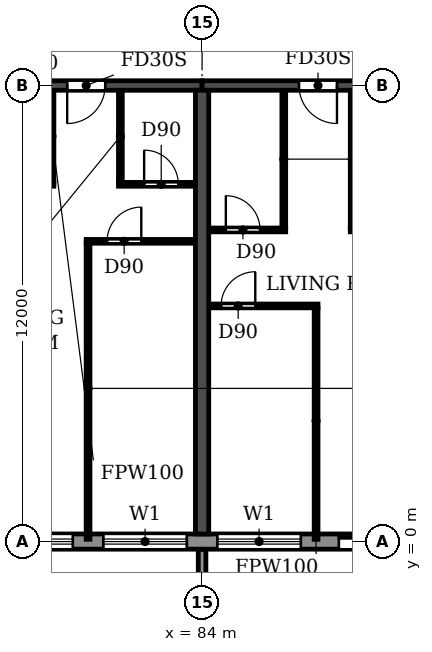
"""IFC4 building model, lengths in metres.
Left out: names, types, materials, properties, quantities, classifications, styles, units other than length and angle.
Written with IfcOpenShell. Run it as: python <this file> out.ifc"""

import sys

from ifc_helpers import new_model, si_unit, direction, frame, frame_2d, origin, place, context, subcontext, project, spatial, polyline, rectangle, outline, extrude, source, transform, mapped, element, fill, save


model = new_model("IFC4")
c1 = context("Model", 3, precision=1e-05, world=origin(), true_north=direction((0.0, 1.0)))
c2 = subcontext(c1, "Body", "Model", "MODEL_VIEW")
j1 = project(units=[si_unit("LENGTHUNIT", "METRE"), si_unit("PLANEANGLEUNIT", "RADIAN")], contexts=[c1])
p1 = place(None, origin())
s1 = spatial("IfcSite", under=j1, at=p1, CompositionType="ELEMENT")
p2 = place(p1, origin())
s2 = spatial("IfcBuilding", under=s1, at=p2, CompositionType="ELEMENT")
p3 = place(p2, frame((0.0, 0.0, 102.6)))
s3 = spatial("IfcBuildingStorey", under=s2, at=p3, CompositionType="ELEMENT", Elevation=102.6)
p4 = place(p3, frame((84.0, 0.2, 0.0), z_axis=(0.0, 0.0, 1.0), x_axis=(0.0, 1.0, 0.0)))
e1 = element("IfcWall", 1, at=p4, inside=s3, PredefinedType="SHEAR", context=c2, shape_type="SweptSolid", body=[
    extrude(rectangle(XDim=11.675, YDim=0.35, at=frame_2d((5.837, 0.0))), origin(), (0.0, 0.0, 1.0), 3.0),
])
p5 = place(p3, frame((78.0, 12.0, 0.0), z_axis=(0.0, 0.0, 1.0), x_axis=(1.0, 0.0, 0.0)))
e2 = element("IfcWall", 2, at=p5, inside=s3, PredefinedType="SHEAR", context=c2, shape_type="SweptSolid", body=[
    extrude(rectangle(XDim=6.0, YDim=0.25, at=frame_2d((3.0, 0.0))), origin(), (0.0, 0.0, 1.0), 2.4),
])
p6 = place(p5, frame((2.45, 0.0, 0.0)))
e3 = element("IfcOpeningElement", 3, at=p6, cuts=e2, PredefinedType="OPENING", context=c2, shape_type="SweptSolid", body=[
    extrude(rectangle(XDim=1.0, YDim=2.1, at=frame_2d((0.5, 1.05))), frame((0.0, 0.135, 0.0), z_axis=(0.0, -1.0, 0.0), x_axis=(1.0, 0.0, 0.0)), (0.0, 0.0, 1.0), 0.27),
])
p7 = place(p3, frame((84.0, 12.0, 0.0), z_axis=(0.0, 0.0, 1.0), x_axis=(1.0, 0.0, 0.0)))
e4 = element("IfcWall", 4, at=p7, inside=s3, PredefinedType="SHEAR", context=c2, shape_type="SweptSolid", body=[
    extrude(rectangle(XDim=6.0, YDim=0.25, at=frame_2d((3.0, 0.0))), origin(), (0.0, 0.0, 1.0), 2.4),
])
p8 = place(p7, frame((2.55, 0.0, 0.0)))
e5 = element("IfcOpeningElement", 5, at=p8, cuts=e4, PredefinedType="OPENING", context=c2, shape_type="SweptSolid", body=[
    extrude(rectangle(XDim=1.0, YDim=2.1, at=frame_2d((0.5, 1.05))), frame((0.0, 0.135, 0.0), z_axis=(0.0, -1.0, 0.0), x_axis=(1.0, 0.0, 0.0)), (0.0, 0.0, 1.0), 0.27),
])
p9 = place(p3, frame((10.683, 0.0, 0.0), z_axis=(0.0, 0.0, 1.0), x_axis=(1.0, 0.0, 0.0)))
e6 = element("IfcWall", 6, at=p9, inside=s3, PredefinedType="STANDARD", context=c2, shape_type="SweptSolid", body=[
    extrude(rectangle(XDim=80.634, YDim=0.4, at=frame_2d((40.317, 0.0))), origin(), (0.0, 0.0, 1.0), 3.0),
])
p10 = place(p9, frame((1.717, 0.0, 0.9)))
e7 = element("IfcOpeningElement", 7, at=p10, cuts=e6, PredefinedType="OPENING", context=c2, shape_type="SweptSolid", body=[
    extrude(rectangle(XDim=2.2, YDim=1.5, at=frame_2d((1.1, 0.75))), frame((0.0, 0.21, 0.0), z_axis=(0.0, -1.0, 0.0), x_axis=(1.0, 0.0, 0.0)), (0.0, 0.0, 1.0), 0.42),
])
p11 = place(p9, frame((4.917, 0.0, 0.0)))
e8 = element("IfcOpeningElement", 8, at=p11, cuts=e6, PredefinedType="OPENING", context=c2, shape_type="SweptSolid", body=[
    extrude(rectangle(XDim=1.8, YDim=2.4, at=frame_2d((0.9, 1.2))), frame((0.0, 0.21, 0.0), z_axis=(0.0, -1.0, 0.0), x_axis=(1.0, 0.0, 0.0)), (0.0, 0.0, 1.0), 0.42),
])
p12 = place(p9, frame((7.717, 0.0, 0.9)))
e9 = element("IfcOpeningElement", 9, at=p12, cuts=e6, PredefinedType="OPENING", context=c2, shape_type="SweptSolid", body=[
    extrude(rectangle(XDim=2.2, YDim=1.5, at=frame_2d((1.1, 0.75))), frame((0.0, 0.21, 0.0), z_axis=(0.0, -1.0, 0.0), x_axis=(1.0, 0.0, 0.0)), (0.0, 0.0, 1.0), 0.42),
])
p13 = place(p9, frame((10.717, 0.0, 0.9)))
e10 = element("IfcOpeningElement", 10, at=p13, cuts=e6, PredefinedType="OPENING", context=c2, shape_type="SweptSolid", body=[
    extrude(rectangle(XDim=2.2, YDim=1.5, at=frame_2d((1.1, 0.75))), frame((0.0, 0.21, 0.0), z_axis=(0.0, -1.0, 0.0), x_axis=(1.0, 0.0, 0.0)), (0.0, 0.0, 1.0), 0.42),
])
p14 = place(p9, frame((13.717, 0.0, 0.9)))
e11 = element("IfcOpeningElement", 11, at=p14, cuts=e6, PredefinedType="OPENING", context=c2, shape_type="SweptSolid", body=[
    extrude(rectangle(XDim=2.2, YDim=1.5, at=frame_2d((1.1, 0.75))), frame((0.0, 0.21, 0.0), z_axis=(0.0, -1.0, 0.0), x_axis=(1.0, 0.0, 0.0)), (0.0, 0.0, 1.0), 0.42),
])
p15 = place(p9, frame((16.717, 0.0, 0.9)))
e12 = element("IfcOpeningElement", 12, at=p15, cuts=e6, PredefinedType="OPENING", context=c2, shape_type="SweptSolid", body=[
    extrude(rectangle(XDim=2.2, YDim=1.5, at=frame_2d((1.1, 0.75))), frame((0.0, 0.21, 0.0), z_axis=(0.0, -1.0, 0.0), x_axis=(1.0, 0.0, 0.0)), (0.0, 0.0, 1.0), 0.42),
])
p16 = place(p9, frame((19.717, 0.0, 0.9)))
e13 = element("IfcOpeningElement", 13, at=p16, cuts=e6, PredefinedType="OPENING", context=c2, shape_type="SweptSolid", body=[
    extrude(rectangle(XDim=2.2, YDim=1.5, at=frame_2d((1.1, 0.75))), frame((0.0, 0.21, 0.0), z_axis=(0.0, -1.0, 0.0), x_axis=(1.0, 0.0, 0.0)), (0.0, 0.0, 1.0), 0.42),
])
p17 = place(p9, frame((22.717, 0.0, 0.9)))
e14 = element("IfcOpeningElement", 14, at=p17, cuts=e6, PredefinedType="OPENING", context=c2, shape_type="SweptSolid", body=[
    extrude(rectangle(XDim=2.2, YDim=1.5, at=frame_2d((1.1, 0.75))), frame((0.0, 0.21, 0.0), z_axis=(0.0, -1.0, 0.0), x_axis=(1.0, 0.0, 0.0)), (0.0, 0.0, 1.0), 0.42),
])
p18 = place(p9, frame((25.717, 0.0, 0.9)))
e15 = element("IfcOpeningElement", 15, at=p18, cuts=e6, PredefinedType="OPENING", context=c2, shape_type="SweptSolid", body=[
    extrude(rectangle(XDim=2.2, YDim=1.5, at=frame_2d((1.1, 0.75))), frame((0.0, 0.21, 0.0), z_axis=(0.0, -1.0, 0.0), x_axis=(1.0, 0.0, 0.0)), (0.0, 0.0, 1.0), 0.42),
])
p19 = place(p9, frame((28.917, 0.0, 0.0)))
e16 = element("IfcOpeningElement", 16, at=p19, cuts=e6, PredefinedType="OPENING", context=c2, shape_type="SweptSolid", body=[
    extrude(rectangle(XDim=1.8, YDim=2.4, at=frame_2d((0.9, 1.2))), frame((0.0, 0.21, 0.0), z_axis=(0.0, -1.0, 0.0), x_axis=(1.0, 0.0, 0.0)), (0.0, 0.0, 1.0), 0.42),
])
p20 = place(p9, frame((31.717, 0.0, 0.9)))
e17 = element("IfcOpeningElement", 17, at=p20, cuts=e6, PredefinedType="OPENING", context=c2, shape_type="SweptSolid", body=[
    extrude(rectangle(XDim=2.2, YDim=1.5, at=frame_2d((1.1, 0.75))), frame((0.0, 0.21, 0.0), z_axis=(0.0, -1.0, 0.0), x_axis=(1.0, 0.0, 0.0)), (0.0, 0.0, 1.0), 0.42),
])
p21 = place(p9, frame((34.717, 0.0, 0.9)))
e18 = element("IfcOpeningElement", 18, at=p21, cuts=e6, PredefinedType="OPENING", context=c2, shape_type="SweptSolid", body=[
    extrude(rectangle(XDim=2.2, YDim=1.5, at=frame_2d((1.1, 0.75))), frame((0.0, 0.21, 0.0), z_axis=(0.0, -1.0, 0.0), x_axis=(1.0, 0.0, 0.0)), (0.0, 0.0, 1.0), 0.42),
])
p22 = place(p9, frame((37.717, 0.0, 0.9)))
e19 = element("IfcOpeningElement", 19, at=p22, cuts=e6, PredefinedType="OPENING", context=c2, shape_type="SweptSolid", body=[
    extrude(rectangle(XDim=2.2, YDim=1.5, at=frame_2d((1.1, 0.75))), frame((0.0, 0.21, 0.0), z_axis=(0.0, -1.0, 0.0), x_axis=(1.0, 0.0, 0.0)), (0.0, 0.0, 1.0), 0.42),
])
p23 = place(p9, frame((40.717, 0.0, 0.9)))
e20 = element("IfcOpeningElement", 20, at=p23, cuts=e6, PredefinedType="OPENING", context=c2, shape_type="SweptSolid", body=[
    extrude(rectangle(XDim=2.2, YDim=1.5, at=frame_2d((1.1, 0.75))), frame((0.0, 0.21, 0.0), z_axis=(0.0, -1.0, 0.0), x_axis=(1.0, 0.0, 0.0)), (0.0, 0.0, 1.0), 0.42),
])
p24 = place(p9, frame((43.717, 0.0, 0.9)))
e21 = element("IfcOpeningElement", 21, at=p24, cuts=e6, PredefinedType="OPENING", context=c2, shape_type="SweptSolid", body=[
    extrude(rectangle(XDim=2.2, YDim=1.5, at=frame_2d((1.1, 0.75))), frame((0.0, 0.21, 0.0), z_axis=(0.0, -1.0, 0.0), x_axis=(1.0, 0.0, 0.0)), (0.0, 0.0, 1.0), 0.42),
])
p25 = place(p9, frame((46.717, 0.0, 0.9)))
e22 = element("IfcOpeningElement", 22, at=p25, cuts=e6, PredefinedType="OPENING", context=c2, shape_type="SweptSolid", body=[
    extrude(rectangle(XDim=2.2, YDim=1.5, at=frame_2d((1.1, 0.75))), frame((0.0, 0.21, 0.0), z_axis=(0.0, -1.0, 0.0), x_axis=(1.0, 0.0, 0.0)), (0.0, 0.0, 1.0), 0.42),
])
p26 = place(p9, frame((49.917, 0.0, 0.0)))
e23 = element("IfcOpeningElement", 23, at=p26, cuts=e6, PredefinedType="OPENING", context=c2, shape_type="SweptSolid", body=[
    extrude(rectangle(XDim=1.8, YDim=2.4, at=frame_2d((0.9, 1.2))), frame((0.0, 0.21, 0.0), z_axis=(0.0, -1.0, 0.0), x_axis=(1.0, 0.0, 0.0)), (0.0, 0.0, 1.0), 0.42),
])
p27 = place(p9, frame((52.717, 0.0, 0.9)))
e24 = element("IfcOpeningElement", 24, at=p27, cuts=e6, PredefinedType="OPENING", context=c2, shape_type="SweptSolid", body=[
    extrude(rectangle(XDim=2.2, YDim=1.5, at=frame_2d((1.1, 0.75))), frame((0.0, 0.21, 0.0), z_axis=(0.0, -1.0, 0.0), x_axis=(1.0, 0.0, 0.0)), (0.0, 0.0, 1.0), 0.42),
])
p28 = place(p9, frame((55.717, 0.0, 0.9)))
e25 = element("IfcOpeningElement", 25, at=p28, cuts=e6, PredefinedType="OPENING", context=c2, shape_type="SweptSolid", body=[
    extrude(rectangle(XDim=2.2, YDim=1.5, at=frame_2d((1.1, 0.75))), frame((0.0, 0.21, 0.0), z_axis=(0.0, -1.0, 0.0), x_axis=(1.0, 0.0, 0.0)), (0.0, 0.0, 1.0), 0.42),
])
p29 = place(p9, frame((58.717, 0.0, 0.9)))
e26 = element("IfcOpeningElement", 26, at=p29, cuts=e6, PredefinedType="OPENING", context=c2, shape_type="SweptSolid", body=[
    extrude(rectangle(XDim=2.2, YDim=1.5, at=frame_2d((1.1, 0.75))), frame((0.0, 0.21, 0.0), z_axis=(0.0, -1.0, 0.0), x_axis=(1.0, 0.0, 0.0)), (0.0, 0.0, 1.0), 0.42),
])
p30 = place(p9, frame((61.717, 0.0, 0.9)))
e27 = element("IfcOpeningElement", 27, at=p30, cuts=e6, PredefinedType="OPENING", context=c2, shape_type="SweptSolid", body=[
    extrude(rectangle(XDim=2.2, YDim=1.5, at=frame_2d((1.1, 0.75))), frame((0.0, 0.21, 0.0), z_axis=(0.0, -1.0, 0.0), x_axis=(1.0, 0.0, 0.0)), (0.0, 0.0, 1.0), 0.42),
])
p31 = place(p9, frame((64.717, 0.0, 0.9)))
e28 = element("IfcOpeningElement", 28, at=p31, cuts=e6, PredefinedType="OPENING", context=c2, shape_type="SweptSolid", body=[
    extrude(rectangle(XDim=2.2, YDim=1.5, at=frame_2d((1.1, 0.75))), frame((0.0, 0.21, 0.0), z_axis=(0.0, -1.0, 0.0), x_axis=(1.0, 0.0, 0.0)), (0.0, 0.0, 1.0), 0.42),
])
p32 = place(p9, frame((67.717, 0.0, 0.9)))
e29 = element("IfcOpeningElement", 29, at=p32, cuts=e6, PredefinedType="OPENING", context=c2, shape_type="SweptSolid", body=[
    extrude(rectangle(XDim=2.2, YDim=1.5, at=frame_2d((1.1, 0.75))), frame((0.0, 0.21, 0.0), z_axis=(0.0, -1.0, 0.0), x_axis=(1.0, 0.0, 0.0)), (0.0, 0.0, 1.0), 0.42),
])
p33 = place(p9, frame((70.717, 0.0, 0.9)))
e30 = element("IfcOpeningElement", 30, at=p33, cuts=e6, PredefinedType="OPENING", context=c2, shape_type="SweptSolid", body=[
    extrude(rectangle(XDim=2.2, YDim=1.5, at=frame_2d((1.1, 0.75))), frame((0.0, 0.21, 0.0), z_axis=(0.0, -1.0, 0.0), x_axis=(1.0, 0.0, 0.0)), (0.0, 0.0, 1.0), 0.42),
])
p34 = place(p9, frame((73.717, 0.0, 0.9)))
e31 = element("IfcOpeningElement", 31, at=p34, cuts=e6, PredefinedType="OPENING", context=c2, shape_type="SweptSolid", body=[
    extrude(rectangle(XDim=2.2, YDim=1.5, at=frame_2d((1.1, 0.75))), frame((0.0, 0.21, 0.0), z_axis=(0.0, -1.0, 0.0), x_axis=(1.0, 0.0, 0.0)), (0.0, 0.0, 1.0), 0.42),
])
p35 = place(p9, frame((76.917, 0.0, 0.0)))
e32 = element("IfcOpeningElement", 32, at=p35, cuts=e6, PredefinedType="OPENING", context=c2, shape_type="SweptSolid", body=[
    extrude(rectangle(XDim=1.8, YDim=2.4, at=frame_2d((0.9, 1.2))), frame((0.0, 0.21, 0.0), z_axis=(0.0, -1.0, 0.0), x_axis=(1.0, 0.0, 0.0)), (0.0, 0.0, 1.0), 0.42),
])
m1 = source(origin(), c2, "Body", "SweptSolid", [
    extrude(outline(polyline([(0.0, 0.0), (0.2, 0.0), (0.2, 1.65), (0.0, 1.65), (0.0, 0.0)])), origin(), (0.0, 0.0, 1.0), 3.1),
])
p36 = place(p3, frame((83.9, -1.85, 0.0)))
e33 = element("IfcWall", 33, at=p36, inside=s3, PredefinedType="STANDARD", context=c2, shape_type="MappedRepresentation", body=[
    mapped(m1, transform((0.0, 0.0, 0.0))),
])
p37 = place(p3, frame((84.185, 6.2, 0.0), z_axis=(0.0, 0.0, 1.0), x_axis=(1.0, 0.0, 0.0)))
e34 = element("IfcWall", 34, at=p37, inside=s3, PredefinedType="PARTITIONING", context=c2, shape_type="SweptSolid", body=[
    extrude(rectangle(XDim=2.865, YDim=0.1, at=frame_2d((1.433, 0.0))), origin(), (0.0, 0.0, 1.0), 3.0),
])
p38 = place(p37, frame((0.315, 0.0, 0.0)))
e35 = element("IfcOpeningElement", 35, at=p38, cuts=e34, PredefinedType="OPENING", context=c2, shape_type="SweptSolid", body=[
    extrude(rectangle(XDim=0.9, YDim=2.1, at=frame_2d((0.45, 1.05))), frame((0.0, 0.06, 0.0), z_axis=(0.0, -1.0, 0.0), x_axis=(1.0, 0.0, 0.0)), (0.0, 0.0, 1.0), 0.12),
])
p39 = place(p3, frame((80.95, 7.9, 0.0), z_axis=(0.0, 0.0, 1.0), x_axis=(1.0, 0.0, 0.0)))
e36 = element("IfcWall", 36, at=p39, inside=s3, PredefinedType="PARTITIONING", context=c2, shape_type="SweptSolid", body=[
    extrude(rectangle(XDim=2.865, YDim=0.1, at=frame_2d((1.433, 0.0))), origin(), (0.0, 0.0, 1.0), 3.0),
])
p40 = place(p39, frame((0.55, 0.0, 0.0)))
e37 = element("IfcOpeningElement", 37, at=p40, cuts=e36, PredefinedType="OPENING", context=c2, shape_type="SweptSolid", body=[
    extrude(rectangle(XDim=0.9, YDim=2.1, at=frame_2d((0.45, 1.05))), frame((0.0, 0.06, 0.0), z_axis=(0.0, -1.0, 0.0), x_axis=(1.0, 0.0, 0.0)), (0.0, 0.0, 1.0), 0.12),
])
p41 = place(p3, frame((84.185, 8.2, 0.0), z_axis=(0.0, 0.0, 1.0), x_axis=(1.0, 0.0, 0.0)))
e38 = element("IfcWall", 38, at=p41, inside=s3, PredefinedType="PARTITIONING", context=c2, shape_type="SweptSolid", body=[
    extrude(rectangle(XDim=2.015, YDim=0.1, at=frame_2d((1.007, 0.0))), origin(), (0.0, 0.0, 1.0), 3.0),
])
p42 = place(p41, frame((0.44, 0.0, 0.0)))
e39 = element("IfcOpeningElement", 39, at=p42, cuts=e38, PredefinedType="OPENING", context=c2, shape_type="SweptSolid", body=[
    extrude(rectangle(XDim=0.9, YDim=2.1, at=frame_2d((0.45, 1.05))), frame((0.0, 0.06, 0.0), z_axis=(0.0, -1.0, 0.0), x_axis=(1.0, 0.0, 0.0)), (0.0, 0.0, 1.0), 0.12),
])
p43 = place(p3, frame((87.9, 8.2, 0.0), z_axis=(0.0, 0.0, 1.0), x_axis=(1.0, 0.0, 0.0)))
e40 = element("IfcWall", 40, at=p43, inside=s3, PredefinedType="PARTITIONING", context=c2, shape_type="SweptSolid", body=[
    extrude(rectangle(XDim=1.915, YDim=0.1, at=frame_2d((0.958, 0.0))), origin(), (0.0, 0.0, 1.0), 3.0),
])
p44 = place(p43, frame((0.675, 0.0, 0.0)))
e41 = element("IfcOpeningElement", 41, at=p44, cuts=e40, PredefinedType="OPENING", context=c2, shape_type="SweptSolid", body=[
    extrude(rectangle(XDim=0.8, YDim=2.1, at=frame_2d((0.4, 1.05))), frame((0.0, 0.06, 0.0), z_axis=(0.0, -1.0, 0.0), x_axis=(1.0, 0.0, 0.0)), (0.0, 0.0, 1.0), 0.12),
])
p45 = place(p3, frame((78.185, 9.4, 0.0), z_axis=(0.0, 0.0, 1.0), x_axis=(1.0, 0.0, 0.0)))
e42 = element("IfcWall", 42, at=p45, inside=s3, PredefinedType="PARTITIONING", context=c2, shape_type="SweptSolid", body=[
    extrude(rectangle(XDim=1.915, YDim=0.1, at=frame_2d((0.958, 0.0))), origin(), (0.0, 0.0, 1.0), 3.0),
])
p46 = place(p45, frame((0.44, 0.0, 0.0)))
e43 = element("IfcOpeningElement", 43, at=p46, cuts=e42, PredefinedType="OPENING", context=c2, shape_type="SweptSolid", body=[
    extrude(rectangle(XDim=0.8, YDim=2.1, at=frame_2d((0.4, 1.05))), frame((0.0, 0.06, 0.0), z_axis=(0.0, -1.0, 0.0), x_axis=(1.0, 0.0, 0.0)), (0.0, 0.0, 1.0), 0.12),
])
p47 = place(p3, frame((81.8, 9.4, 0.0), z_axis=(0.0, 0.0, 1.0), x_axis=(1.0, 0.0, 0.0)))
e44 = element("IfcWall", 44, at=p47, inside=s3, PredefinedType="PARTITIONING", context=c2, shape_type="SweptSolid", body=[
    extrude(rectangle(XDim=2.015, YDim=0.1, at=frame_2d((1.007, 0.0))), origin(), (0.0, 0.0, 1.0), 3.0),
])
p48 = place(p47, frame((0.675, 0.0, 0.0)))
e45 = element("IfcOpeningElement", 45, at=p48, cuts=e44, PredefinedType="OPENING", context=c2, shape_type="SweptSolid", body=[
    extrude(rectangle(XDim=0.9, YDim=2.1, at=frame_2d((0.45, 1.05))), frame((0.0, 0.06, 0.0), z_axis=(0.0, -1.0, 0.0), x_axis=(1.0, 0.0, 0.0)), (0.0, 0.0, 1.0), 0.12),
])
p49 = place(p3, frame((80.05, 9.45, 0.0), z_axis=(0.0, 0.0, 1.0), x_axis=(0.0, 1.0, 0.0)))
e46 = element("IfcWall", 46, at=p49, inside=s3, PredefinedType="PARTITIONING", context=c2, shape_type="SweptSolid", body=[
    extrude(rectangle(XDim=2.415, YDim=0.1, at=frame_2d((1.208, 0.0))), origin(), (0.0, 0.0, 1.0), 3.0),
])
p50 = place(p3, frame((81.0, 0.06, 0.0), z_axis=(0.0, 0.0, 1.0), x_axis=(0.0, 1.0, 0.0)))
e47 = element("IfcWall", 47, at=p50, inside=s3, PredefinedType="PARTITIONING", context=c2, shape_type="SweptSolid", body=[
    extrude(rectangle(XDim=7.79, YDim=0.1, at=frame_2d((3.895, 0.0))), origin(), (0.0, 0.0, 1.0), 3.0),
])
p51 = place(p3, frame((81.85, 9.45, 0.0), z_axis=(0.0, 0.0, 1.0), x_axis=(0.0, 1.0, 0.0)))
e48 = element("IfcWall", 48, at=p51, inside=s3, PredefinedType="PARTITIONING", context=c2, shape_type="SweptSolid", body=[
    extrude(rectangle(XDim=2.415, YDim=0.1, at=frame_2d((1.208, 0.0))), origin(), (0.0, 0.0, 1.0), 3.0),
])
p52 = place(p3, frame((86.15, 8.25, 0.0), z_axis=(0.0, 0.0, 1.0), x_axis=(0.0, 1.0, 0.0)))
e49 = element("IfcWall", 49, at=p52, inside=s3, PredefinedType="PARTITIONING", context=c2, shape_type="SweptSolid", body=[
    extrude(rectangle(XDim=3.615, YDim=0.1, at=frame_2d((1.808, 0.0))), origin(), (0.0, 0.0, 1.0), 3.0),
])
p53 = place(p3, frame((87.0, 0.06, 0.0), z_axis=(0.0, 0.0, 1.0), x_axis=(0.0, 1.0, 0.0)))
e50 = element("IfcWall", 50, at=p53, inside=s3, PredefinedType="PARTITIONING", context=c2, shape_type="SweptSolid", body=[
    extrude(rectangle(XDim=6.09, YDim=0.1, at=frame_2d((3.045, 0.0))), origin(), (0.0, 0.0, 1.0), 3.0),
])
p54 = place(p3, frame((87.95, 8.25, 0.0), z_axis=(0.0, 0.0, 1.0), x_axis=(0.0, 1.0, 0.0)))
e51 = element("IfcWall", 51, at=p54, inside=s3, PredefinedType="PARTITIONING", context=c2, shape_type="SweptSolid", body=[
    extrude(rectangle(XDim=3.615, YDim=0.1, at=frame_2d((1.808, 0.0))), origin(), (0.0, 0.0, 1.0), 3.0),
])
p55 = place(p32, origin())
e52 = element("IfcWindow", 52, at=p55, inside=s3, PartitioningType="DOUBLE_PANEL_HORIZONTAL", PredefinedType="WINDOW", context=c2, shape_type="SweptSolid", body=[
    extrude(rectangle(XDim=2.2, YDim=1.5, at=frame_2d((1.1, 0.75))), frame((0.0, 0.03, 0.0), z_axis=(0.0, -1.0, 0.0), x_axis=(1.0, 0.0, 0.0)), (0.0, 0.0, 1.0), 0.06),
])
fill(e29, e52)
p56 = place(p33, origin())
e53 = element("IfcWindow", 53, at=p56, inside=s3, PartitioningType="DOUBLE_PANEL_HORIZONTAL", PredefinedType="WINDOW", context=c2, shape_type="SweptSolid", body=[
    extrude(rectangle(XDim=2.2, YDim=1.5, at=frame_2d((1.1, 0.75))), frame((0.0, 0.03, 0.0), z_axis=(0.0, -1.0, 0.0), x_axis=(1.0, 0.0, 0.0)), (0.0, 0.0, 1.0), 0.06),
])
fill(e30, e53)
p57 = place(p34, origin())
e54 = element("IfcWindow", 54, at=p57, inside=s3, PartitioningType="DOUBLE_PANEL_HORIZONTAL", PredefinedType="WINDOW", context=c2, shape_type="SweptSolid", body=[
    extrude(rectangle(XDim=2.2, YDim=1.5, at=frame_2d((1.1, 0.75))), frame((0.0, 0.03, 0.0), z_axis=(0.0, -1.0, 0.0), x_axis=(1.0, 0.0, 0.0)), (0.0, 0.0, 1.0), 0.06),
])
fill(e31, e54)
p58 = place(p35, origin())
e55 = element("IfcDoor", 55, at=p58, inside=s3, OperationType="DOUBLE_DOOR_SLIDING", PredefinedType="DOOR", context=c2, shape_type="SweptSolid", body=[
    extrude(rectangle(XDim=1.8, YDim=2.4, at=frame_2d((0.9, 1.2))), frame((0.0, 0.025, 0.0), z_axis=(0.0, -1.0, 0.0), x_axis=(1.0, 0.0, 0.0)), (0.0, 0.0, 1.0), 0.05),
])
fill(e32, e55)
p59 = place(p6, frame((1.0, 0.0, 0.0), z_axis=(0.0, 0.0, 1.0), x_axis=(-1.0, 0.0, 0.0)))
e56 = element("IfcDoor", 56, at=p59, inside=s3, OperationType="SINGLE_SWING_RIGHT", PredefinedType="DOOR", context=c2, shape_type="SweptSolid", body=[
    extrude(rectangle(XDim=1.0, YDim=2.1, at=frame_2d((0.5, 1.05))), frame((0.0, 0.025, 0.0), z_axis=(0.0, -1.0, 0.0), x_axis=(1.0, 0.0, 0.0)), (0.0, 0.0, 1.0), 0.05),
])
fill(e3, e56)
p60 = place(p40, origin())
e57 = element("IfcDoor", 57, at=p60, inside=s3, OperationType="SINGLE_SWING_RIGHT", PredefinedType="DOOR", context=c2, shape_type="SweptSolid", body=[
    extrude(rectangle(XDim=0.9, YDim=2.1, at=frame_2d((0.45, 1.05))), frame((0.0, 0.025, 0.0), z_axis=(0.0, -1.0, 0.0), x_axis=(1.0, 0.0, 0.0)), (0.0, 0.0, 1.0), 0.05),
])
fill(e37, e57)
p61 = place(p48, origin())
e58 = element("IfcDoor", 58, at=p61, inside=s3, OperationType="SINGLE_SWING_LEFT", PredefinedType="DOOR", context=c2, shape_type="SweptSolid", body=[
    extrude(rectangle(XDim=0.9, YDim=2.1, at=frame_2d((0.45, 1.05))), frame((0.0, 0.025, 0.0), z_axis=(0.0, -1.0, 0.0), x_axis=(1.0, 0.0, 0.0)), (0.0, 0.0, 1.0), 0.05),
])
fill(e45, e58)
p62 = place(p38, origin())
e59 = element("IfcDoor", 59, at=p62, inside=s3, OperationType="SINGLE_SWING_RIGHT", PredefinedType="DOOR", context=c2, shape_type="SweptSolid", body=[
    extrude(rectangle(XDim=0.9, YDim=2.1, at=frame_2d((0.45, 1.05))), frame((0.0, 0.025, 0.0), z_axis=(0.0, -1.0, 0.0), x_axis=(1.0, 0.0, 0.0)), (0.0, 0.0, 1.0), 0.05),
])
fill(e35, e59)
p63 = place(p42, origin())
e60 = element("IfcDoor", 60, at=p63, inside=s3, OperationType="SINGLE_SWING_LEFT", PredefinedType="DOOR", context=c2, shape_type="SweptSolid", body=[
    extrude(rectangle(XDim=0.9, YDim=2.1, at=frame_2d((0.45, 1.05))), frame((0.0, 0.025, 0.0), z_axis=(0.0, -1.0, 0.0), x_axis=(1.0, 0.0, 0.0)), (0.0, 0.0, 1.0), 0.05),
])
fill(e39, e60)
p64 = place(p8, frame((1.0, 0.0, 0.0), z_axis=(0.0, 0.0, 1.0), x_axis=(-1.0, 0.0, 0.0)))
e61 = element("IfcDoor", 61, at=p64, inside=s3, OperationType="SINGLE_SWING_LEFT", PredefinedType="DOOR", context=c2, shape_type="SweptSolid", body=[
    extrude(rectangle(XDim=1.0, YDim=2.1, at=frame_2d((0.5, 1.05))), frame((0.0, 0.025, 0.0), z_axis=(0.0, -1.0, 0.0), x_axis=(1.0, 0.0, 0.0)), (0.0, 0.0, 1.0), 0.05),
])
fill(e5, e61)
save(model, sys.argv[1])
